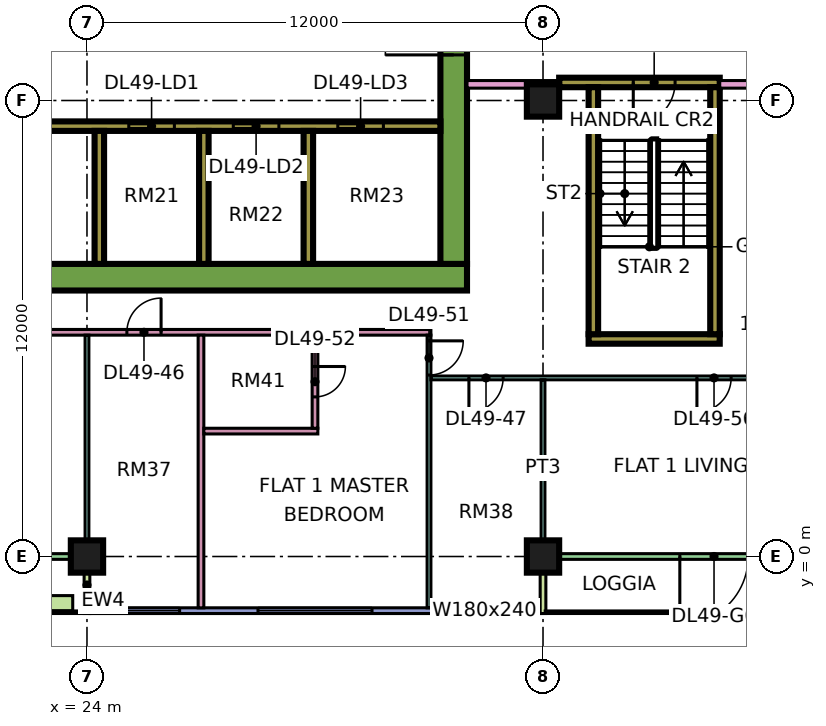
"""IFC4 building model, lengths in metres.
Left out: names, types, materials, properties, quantities, classifications, styles, units other than length and angle.
Written with IfcOpenShell. Run it as: python <this file> out.ifc"""

import sys

from ifc_helpers import new_model, si_unit, direction, frame, frame_2d, origin, origin_2d, place, context, subcontext, project, spatial, rectangle, extrude, element, fill, save


model = new_model("IFC4")
c1 = context("Model", 3, precision=1e-05, world=origin(), true_north=direction((0.0, 1.0)))
c2 = subcontext(c1, "Body", "Model", "MODEL_VIEW")
j1 = project(units=[si_unit("LENGTHUNIT", "METRE"), si_unit("PLANEANGLEUNIT", "RADIAN")], contexts=[c1])
p1 = place(None, origin())
s1 = spatial("IfcSite", under=j1, at=p1, CompositionType="ELEMENT")
p2 = place(p1, origin())
s2 = spatial("IfcBuilding", under=s1, at=p2, CompositionType="ELEMENT")
p3 = place(p2, frame((0.0, 0.0, 211.65)))
s3 = spatial("IfcBuildingStorey", under=s2, at=p3, CompositionType="ELEMENT", Elevation=211.65)
for number, where, z_axis, x_axis in (
    (1, (24.0, 0.0, 0.0), (0.0, 0.0, 1.0), (1.0, 0.0, 0.0)),
    (2, (36.0, 0.0, 0.0), (0.0, 0.0, 1.0), (1.0, 0.0, 0.0)),
    (3, (36.0, 12.0, 0.0), (0.0, 0.0, 1.0), (1.0, 0.0, 0.0)),
):
    element("IfcColumn", number, at=place(p3, frame(where, z_axis=z_axis, x_axis=x_axis)), inside=s3, PredefinedType="COLUMN", context=c2, shape_type="SweptSolid", body=[
        extrude(rectangle(XDim=0.85, YDim=0.85, at=origin_2d()), origin(), (0.0, 0.0, 1.0), 3.75),
    ])
p4 = place(p3, frame((9.0, 7.35, 0.0), z_axis=(0.0, 0.0, 1.0), x_axis=(1.0, 0.0, 0.0)))
e4 = element("IfcWall", 4, at=p4, inside=s3, PredefinedType="SHEAR", context=c2, shape_type="SweptSolid", body=[
    extrude(rectangle(XDim=25.0, YDim=0.7, at=frame_2d((12.5, 0.0))), origin(), (0.0, 0.0, 1.0), 3.75),
])
p5 = place(p3, frame((33.65, 7.7, 0.0), z_axis=(0.0, 0.0, 1.0), x_axis=(0.0, 1.0, 0.0)))
e5 = element("IfcWall", 5, at=p5, inside=s3, PredefinedType="SHEAR", context=c2, shape_type="SweptSolid", body=[
    extrude(rectangle(XDim=11.6, YDim=0.7, at=frame_2d((5.8, 0.0))), origin(), (0.0, 0.0, 1.0), 3.75),
])
p6 = place(p5, frame((5.5, 0.0, 0.0)))
e6 = element("IfcOpeningElement", 6, at=p6, cuts=e5, PredefinedType="OPENING", context=c2, shape_type="SweptSolid", body=[
    extrude(rectangle(XDim=1.8, YDim=2.4, at=frame_2d((0.9, 1.2))), frame((0.0, 0.36, 0.0), z_axis=(0.0, -1.0, 0.0), x_axis=(1.0, 0.0, 0.0)), (0.0, 0.0, 1.0), 0.72),
])
p7 = place(p3, frame((13.45, 11.325, 0.0), z_axis=(0.0, 0.0, 1.0), x_axis=(1.0, 0.0, 0.0)))
e7 = element("IfcWall", 7, at=p7, inside=s3, PredefinedType="SHEAR", context=c2, shape_type="SweptSolid", body=[
    extrude(rectangle(XDim=19.85, YDim=0.25, at=frame_2d((9.925, 0.0))), origin(), (0.0, 0.0, 1.0), 3.75),
])
p8 = place(p7, frame((11.65, 0.0, 0.0)))
e8 = element("IfcOpeningElement", 8, at=p8, cuts=e7, PredefinedType="OPENING", context=c2, shape_type="SweptSolid", body=[
    extrude(rectangle(XDim=1.2, YDim=2.2, at=frame_2d((0.6, 1.1))), frame((0.0, 0.135, 0.0), z_axis=(0.0, -1.0, 0.0), x_axis=(1.0, 0.0, 0.0)), (0.0, 0.0, 1.0), 0.27),
])
p9 = place(p7, frame((14.4, 0.0, 0.0)))
e9 = element("IfcOpeningElement", 9, at=p9, cuts=e7, PredefinedType="OPENING", context=c2, shape_type="SweptSolid", body=[
    extrude(rectangle(XDim=1.2, YDim=2.2, at=frame_2d((0.6, 1.1))), frame((0.0, 0.135, 0.0), z_axis=(0.0, -1.0, 0.0), x_axis=(1.0, 0.0, 0.0)), (0.0, 0.0, 1.0), 0.27),
])
p10 = place(p7, frame((17.15, 0.0, 0.0)))
e10 = element("IfcOpeningElement", 10, at=p10, cuts=e7, PredefinedType="OPENING", context=c2, shape_type="SweptSolid", body=[
    extrude(rectangle(XDim=1.2, YDim=2.2, at=frame_2d((0.6, 1.1))), frame((0.0, 0.135, 0.0), z_axis=(0.0, -1.0, 0.0), x_axis=(1.0, 0.0, 0.0)), (0.0, 0.0, 1.0), 0.27),
])
p11 = place(p7, frame((4.925, 0.0, 0.0)))
e11 = element("IfcOpeningElement", 11, at=p11, cuts=e7, PredefinedType="OPENING", context=c2, shape_type="SweptSolid", body=[
    extrude(rectangle(XDim=0.9, YDim=2.1, at=frame_2d((0.45, 1.05))), frame((0.0, 0.135, 0.0), z_axis=(0.0, -1.0, 0.0), x_axis=(1.0, 0.0, 0.0)), (0.0, 0.0, 1.0), 0.27),
])
for number, where, z_axis, x_axis in (
    (12, (24.325, 7.7, 0.0), (0.0, 0.0, 1.0), (0.0, 1.0, 0.0)),
    (13, (27.075, 7.7, 0.0), (0.0, 0.0, 1.0), (0.0, 1.0, 0.0)),
    (14, (29.825, 7.7, 0.0), (0.0, 0.0, 1.0), (0.0, 1.0, 0.0)),
):
    element("IfcWall", number, at=place(p3, frame(where, z_axis=z_axis, x_axis=x_axis)), inside=s3, PredefinedType="SHEAR", context=c2, shape_type="SweptSolid", body=[
        extrude(rectangle(XDim=3.5, YDim=0.25, at=frame_2d((1.75, 0.0))), origin(), (0.0, 0.0, 1.0), 3.75),
    ])
p12 = place(p3, frame((37.2, 5.725, 0.0), z_axis=(0.0, 0.0, 1.0), x_axis=(1.0, 0.0, 0.0)))
e15 = element("IfcWall", 15, at=p12, inside=s3, PredefinedType="SHEAR", context=c2, shape_type="SweptSolid", body=[
    extrude(rectangle(XDim=3.45, YDim=0.25, at=frame_2d((1.725, 0.0))), origin(), (0.0, 0.0, 1.0), 3.75),
])
p13 = place(p3, frame((36.425, 12.475, 0.0), z_axis=(0.0, 0.0, 1.0), x_axis=(1.0, 0.0, 0.0)))
e16 = element("IfcWall", 16, at=p13, inside=s3, PredefinedType="SHEAR", context=c2, shape_type="SweptSolid", body=[
    extrude(rectangle(XDim=4.225, YDim=0.25, at=frame_2d((2.112, 0.0))), origin(), (0.0, 0.0, 1.0), 3.75),
])
p14 = place(p13, frame((1.95, 0.0, 0.0)))
e17 = element("IfcOpeningElement", 17, at=p14, cuts=e16, PredefinedType="OPENING", context=c2, shape_type="SweptSolid", body=[
    extrude(rectangle(XDim=1.1, YDim=2.2, at=frame_2d((0.55, 1.1))), frame((0.0, 0.135, 0.0), z_axis=(0.0, -1.0, 0.0), x_axis=(1.0, 0.0, 0.0)), (0.0, 0.0, 1.0), 0.27),
])
for number, where, z_axis, x_axis in (
    (18, (37.325, 5.85, 0.0), (0.0, 0.0, 1.0), (0.0, 1.0, 0.0)),
    (19, (40.525, 5.85, 0.0), (0.0, 0.0, 1.0), (0.0, 1.0, 0.0)),
):
    element("IfcWall", number, at=place(p3, frame(where, z_axis=z_axis, x_axis=x_axis)), inside=s3, PredefinedType="SHEAR", context=c2, shape_type="SweptSolid", body=[
        extrude(rectangle(XDim=6.5, YDim=0.25, at=frame_2d((3.25, 0.0))), origin(), (0.0, 0.0, 1.0), 3.75),
    ])
p15 = place(p3, frame((12.575, 0.0, 0.0), z_axis=(0.0, 0.0, 1.0), x_axis=(1.0, 0.0, 0.0)))
e20 = element("IfcWall", 20, at=p15, inside=s3, PredefinedType="SOLIDWALL", context=c2, shape_type="SweptSolid", body=[
    extrude(rectangle(XDim=11.35, YDim=0.15, at=frame_2d((5.675, 0.0))), origin(), (0.0, 0.0, 1.0), 3.35),
])
p16 = place(p15, frame((0.613, 0.0, 0.0)))
e21 = element("IfcOpeningElement", 21, at=p16, cuts=e20, PredefinedType="OPENING", context=c2, shape_type="SweptSolid", body=[
    extrude(rectangle(XDim=1.2, YDim=2.4, at=frame_2d((0.6, 1.2))), frame((0.0, 0.085, 0.0), z_axis=(0.0, -1.0, 0.0), x_axis=(1.0, 0.0, 0.0)), (0.0, 0.0, 1.0), 0.17),
])
p17 = place(p15, frame((5.163, 0.0, 0.45)))
e22 = element("IfcOpeningElement", 22, at=p17, cuts=e20, PredefinedType="OPENING", context=c2, shape_type="SweptSolid", body=[
    extrude(rectangle(XDim=3.0, YDim=2.4, at=frame_2d((1.5, 1.2))), frame((0.0, 0.085, 0.0), z_axis=(0.0, -1.0, 0.0), x_axis=(1.0, 0.0, 0.0)), (0.0, 0.0, 1.0), 0.17),
])
p18 = place(p3, frame((24.0, -1.5, 0.0), z_axis=(0.0, 0.0, 1.0), x_axis=(0.0, 1.0, 0.0)))
e23 = element("IfcWall", 23, at=p18, inside=s3, PredefinedType="SOLIDWALL", context=c2, shape_type="SweptSolid", body=[
    extrude(rectangle(XDim=1.5, YDim=0.15, at=frame_2d((0.75, 0.0))), origin(), (0.0, 0.0, 1.0), 3.35),
])
p19 = place(p3, frame((24.075, -1.425, 0.0), z_axis=(0.0, 0.0, 1.0), x_axis=(1.0, 0.0, 0.0)))
e24 = element("IfcWall", 24, at=p19, inside=s3, PredefinedType="SOLIDWALL", context=c2, shape_type="SweptSolid", body=[
    extrude(rectangle(XDim=11.85, YDim=0.15, at=frame_2d((5.925, 0.0))), origin(), (0.0, 0.0, 1.0), 3.35),
])
p20 = place(p19, frame((0.562, 0.0, 0.45)))
e25 = element("IfcOpeningElement", 25, at=p20, cuts=e24, PredefinedType="OPENING", context=c2, shape_type="SweptSolid", body=[
    extrude(rectangle(XDim=1.8, YDim=2.4, at=frame_2d((0.9, 1.2))), frame((0.0, 0.085, 0.0), z_axis=(0.0, -1.0, 0.0), x_axis=(1.0, 0.0, 0.0)), (0.0, 0.0, 1.0), 0.17),
])
p21 = place(p19, frame((4.425, 0.0, 0.45)))
e26 = element("IfcOpeningElement", 26, at=p21, cuts=e24, PredefinedType="OPENING", context=c2, shape_type="SweptSolid", body=[
    extrude(rectangle(XDim=3.0, YDim=2.4, at=frame_2d((1.5, 1.2))), frame((0.0, 0.085, 0.0), z_axis=(0.0, -1.0, 0.0), x_axis=(1.0, 0.0, 0.0)), (0.0, 0.0, 1.0), 0.17),
])
p22 = place(p19, frame((9.488, 0.0, 0.45)))
e27 = element("IfcOpeningElement", 27, at=p22, cuts=e24, PredefinedType="OPENING", context=c2, shape_type="SweptSolid", body=[
    extrude(rectangle(XDim=1.8, YDim=2.4, at=frame_2d((0.9, 1.2))), frame((0.0, 0.085, 0.0), z_axis=(0.0, -1.0, 0.0), x_axis=(1.0, 0.0, 0.0)), (0.0, 0.0, 1.0), 0.17),
])
p23 = place(p3, frame((36.075, 0.0, 0.0), z_axis=(0.0, 0.0, 1.0), x_axis=(1.0, 0.0, 0.0)))
e28 = element("IfcWall", 28, at=p23, inside=s3, PredefinedType="SOLIDWALL", context=c2, shape_type="SweptSolid", body=[
    extrude(rectangle(XDim=11.85, YDim=0.15, at=frame_2d((5.925, 0.0))), origin(), (0.0, 0.0, 1.0), 3.35),
])
p24 = place(p23, frame((3.525, 0.0, 0.0)))
e29 = element("IfcOpeningElement", 29, at=p24, cuts=e28, PredefinedType="OPENING", context=c2, shape_type="SweptSolid", body=[
    extrude(rectangle(XDim=1.8, YDim=2.4, at=frame_2d((0.9, 1.2))), frame((0.0, 0.085, 0.0), z_axis=(0.0, -1.0, 0.0), x_axis=(1.0, 0.0, 0.0)), (0.0, 0.0, 1.0), 0.17),
])
p25 = place(p23, frame((10.05, 0.0, 0.45)))
e30 = element("IfcOpeningElement", 30, at=p25, cuts=e28, PredefinedType="OPENING", context=c2, shape_type="SweptSolid", body=[
    extrude(rectangle(XDim=1.2, YDim=2.4, at=frame_2d((0.6, 1.2))), frame((0.0, 0.085, 0.0), z_axis=(0.0, -1.0, 0.0), x_axis=(1.0, 0.0, 0.0)), (0.0, 0.0, 1.0), 0.17),
])
p26 = place(p3, frame((36.0, -1.5, 0.0), z_axis=(0.0, 0.0, 1.0), x_axis=(0.0, 1.0, 0.0)))
e31 = element("IfcWall", 31, at=p26, inside=s3, PredefinedType="SOLIDWALL", context=c2, shape_type="SweptSolid", body=[
    extrude(rectangle(XDim=1.5, YDim=0.15, at=frame_2d((0.75, 0.0))), origin(), (0.0, 0.0, 1.0), 3.35),
])
p27 = place(p3, frame((12.875, -1.229, 0.0), z_axis=(0.0, 0.0, 1.0), x_axis=(1.0, 0.0, 0.0)))
e32 = element("IfcWall", 32, at=p27, inside=s3, PredefinedType="SOLIDWALL", context=c2, shape_type="SweptSolid", body=[
    extrude(rectangle(XDim=10.75, YDim=0.4, at=frame_2d((5.375, 0.0))), origin(), (0.0, 0.0, 1.0), 0.7),
])
p28 = place(p3, frame((11.95, 5.9, 0.0), z_axis=(0.0, 0.0, 1.0), x_axis=(1.0, 0.0, 0.0)))
e33 = element("IfcWall", 33, at=p28, inside=s3, PredefinedType="PARTITIONING", context=c2, shape_type="SweptSolid", body=[
    extrude(rectangle(XDim=21.1, YDim=0.15, at=frame_2d((10.55, 0.0))), origin(), (0.0, 0.0, 1.0), 3.35),
])
p29 = place(p28, frame((1.1, 0.0, 0.0)))
e34 = element("IfcOpeningElement", 34, at=p29, cuts=e33, PredefinedType="OPENING", context=c2, shape_type="SweptSolid", body=[
    extrude(rectangle(XDim=0.9, YDim=2.1, at=frame_2d((0.45, 1.05))), frame((0.0, 0.085, 0.0), z_axis=(0.0, -1.0, 0.0), x_axis=(1.0, 0.0, 0.0)), (0.0, 0.0, 1.0), 0.17),
])
p30 = place(p28, frame((13.1, 0.0, 0.0)))
e35 = element("IfcOpeningElement", 35, at=p30, cuts=e33, PredefinedType="OPENING", context=c2, shape_type="SweptSolid", body=[
    extrude(rectangle(XDim=0.9, YDim=2.1, at=frame_2d((0.45, 1.05))), frame((0.0, 0.085, 0.0), z_axis=(0.0, -1.0, 0.0), x_axis=(1.0, 0.0, 0.0)), (0.0, 0.0, 1.0), 0.17),
])
p31 = place(p28, frame((7.1, 0.0, 0.0)))
e36 = element("IfcOpeningElement", 36, at=p31, cuts=e33, PredefinedType="OPENING", context=c2, shape_type="SweptSolid", body=[
    extrude(rectangle(XDim=0.9, YDim=2.1, at=frame_2d((0.45, 1.05))), frame((0.0, 0.085, 0.0), z_axis=(0.0, -1.0, 0.0), x_axis=(1.0, 0.0, 0.0)), (0.0, 0.0, 1.0), 0.17),
])
p32 = place(p3, frame((24.0, 0.0, 0.0), z_axis=(0.0, 0.0, 1.0), x_axis=(0.0, 1.0, 0.0)))
e37 = element("IfcWall", 37, at=p32, inside=s3, PredefinedType="PARTITIONING", context=c2, shape_type="SweptSolid", body=[
    extrude(rectangle(XDim=5.825, YDim=0.1, at=frame_2d((2.913, 0.0))), origin(), (0.0, 0.0, 1.0), 3.35),
])
p33 = place(p3, frame((27.0, -1.351, 0.0), z_axis=(0.0, 0.0, 1.0), x_axis=(0.0, 1.0, 0.0)))
e38 = element("IfcWall", 38, at=p33, inside=s3, PredefinedType="PARTITIONING", context=c2, shape_type="SweptSolid", body=[
    extrude(rectangle(XDim=7.176, YDim=0.15, at=frame_2d((3.588, 0.0))), origin(), (0.0, 0.0, 1.0), 3.35),
])
p34 = place(p3, frame((27.075, 3.3, 0.0), z_axis=(0.0, 0.0, 1.0), x_axis=(1.0, 0.0, 0.0)))
e39 = element("IfcWall", 39, at=p34, inside=s3, PredefinedType="PARTITIONING", context=c2, shape_type="SweptSolid", body=[
    extrude(rectangle(XDim=3.0, YDim=0.15, at=frame_2d((1.5, 0.0))), origin(), (0.0, 0.0, 1.0), 3.35),
])
p35 = place(p3, frame((30.0, 3.375, 0.0), z_axis=(0.0, 0.0, 1.0), x_axis=(0.0, 1.0, 0.0)))
e40 = element("IfcWall", 40, at=p35, inside=s3, PredefinedType="PARTITIONING", context=c2, shape_type="SweptSolid", body=[
    extrude(rectangle(XDim=2.45, YDim=0.15, at=frame_2d((1.225, 0.0))), origin(), (0.0, 0.0, 1.0), 3.35),
])
p36 = place(p35, frame((0.825, 0.0, 0.0)))
e41 = element("IfcOpeningElement", 41, at=p36, cuts=e40, PredefinedType="OPENING", context=c2, shape_type="SweptSolid", body=[
    extrude(rectangle(XDim=0.8, YDim=2.1, at=frame_2d((0.4, 1.05))), frame((0.0, 0.085, 0.0), z_axis=(0.0, -1.0, 0.0), x_axis=(1.0, 0.0, 0.0)), (0.0, 0.0, 1.0), 0.17),
])
p37 = place(p3, frame((33.0, -1.351, 0.0), z_axis=(0.0, 0.0, 1.0), x_axis=(0.0, 1.0, 0.0)))
e42 = element("IfcWall", 42, at=p37, inside=s3, PredefinedType="PARTITIONING", context=c2, shape_type="SweptSolid", body=[
    extrude(rectangle(XDim=7.176, YDim=0.1, at=frame_2d((3.588, 0.0))), origin(), (0.0, 0.0, 1.0), 3.35),
])
p38 = place(p37, frame((6.126, 0.0, 0.0)))
e43 = element("IfcOpeningElement", 43, at=p38, cuts=e42, PredefinedType="OPENING", context=c2, shape_type="SweptSolid", body=[
    extrude(rectangle(XDim=0.9, YDim=2.1, at=frame_2d((0.45, 1.05))), frame((0.0, 0.06, 0.0), z_axis=(0.0, -1.0, 0.0), x_axis=(1.0, 0.0, 0.0)), (0.0, 0.0, 1.0), 0.12),
])
p39 = place(p3, frame((33.05, 4.7, 0.0), z_axis=(0.0, 0.0, 1.0), x_axis=(1.0, 0.0, 0.0)))
e44 = element("IfcWall", 44, at=p39, inside=s3, PredefinedType="PARTITIONING", context=c2, shape_type="SweptSolid", body=[
    extrude(rectangle(XDim=14.85, YDim=0.1, at=frame_2d((7.425, 0.0))), origin(), (0.0, 0.0, 1.0), 3.35),
])
p40 = place(p39, frame((1.0, 0.0, 0.0)))
e45 = element("IfcOpeningElement", 45, at=p40, cuts=e44, PredefinedType="OPENING", context=c2, shape_type="SweptSolid", body=[
    extrude(rectangle(XDim=0.9, YDim=2.1, at=frame_2d((0.45, 1.05))), frame((0.0, 0.06, 0.0), z_axis=(0.0, -1.0, 0.0), x_axis=(1.0, 0.0, 0.0)), (0.0, 0.0, 1.0), 0.12),
])
p41 = place(p39, frame((13.0, 0.0, 0.0)))
e46 = element("IfcOpeningElement", 46, at=p41, cuts=e44, PredefinedType="OPENING", context=c2, shape_type="SweptSolid", body=[
    extrude(rectangle(XDim=0.9, YDim=2.1, at=frame_2d((0.45, 1.05))), frame((0.0, 0.06, 0.0), z_axis=(0.0, -1.0, 0.0), x_axis=(1.0, 0.0, 0.0)), (0.0, 0.0, 1.0), 0.12),
])
p42 = place(p39, frame((7.0, 0.0, 0.0)))
e47 = element("IfcOpeningElement", 47, at=p42, cuts=e44, PredefinedType="OPENING", context=c2, shape_type="SweptSolid", body=[
    extrude(rectangle(XDim=0.9, YDim=2.1, at=frame_2d((0.45, 1.05))), frame((0.0, 0.06, 0.0), z_axis=(0.0, -1.0, 0.0), x_axis=(1.0, 0.0, 0.0)), (0.0, 0.0, 1.0), 0.12),
])
p43 = place(p3, frame((34.0, 12.425, 0.0), z_axis=(0.0, 0.0, 1.0), x_axis=(1.0, 0.0, 0.0)))
e48 = element("IfcWall", 48, at=p43, inside=s3, PredefinedType="PARTITIONING", context=c2, shape_type="SweptSolid", body=[
    extrude(rectangle(XDim=2.426, YDim=0.2, at=frame_2d((1.213, 0.0))), origin(), (0.0, 0.0, 1.0), 3.35),
])
p44 = place(p3, frame((36.0, 0.0, 0.0), z_axis=(0.0, 0.0, 1.0), x_axis=(0.0, 1.0, 0.0)))
e49 = element("IfcWall", 49, at=p44, inside=s3, PredefinedType="PARTITIONING", context=c2, shape_type="SweptSolid", body=[
    extrude(rectangle(XDim=4.65, YDim=0.1, at=frame_2d((2.325, 0.0))), origin(), (0.0, 0.0, 1.0), 3.35),
])
p45 = place(p3, frame((40.65, 12.425, 0.0), z_axis=(0.0, 0.0, 1.0), x_axis=(1.0, 0.0, 0.0)))
e50 = element("IfcWall", 50, at=p45, inside=s3, PredefinedType="PARTITIONING", context=c2, shape_type="SweptSolid", body=[
    extrude(rectangle(XDim=22.276, YDim=0.2, at=frame_2d((11.138, 0.0))), origin(), (0.0, 0.0, 1.0), 3.35),
])
p46 = place(p45, frame((17.1, 0.0, 0.0)))
e51 = element("IfcOpeningElement", 51, at=p46, cuts=e50, PredefinedType="OPENING", context=c2, shape_type="SweptSolid", body=[
    extrude(rectangle(XDim=1.0, YDim=2.1, at=frame_2d((0.5, 1.05))), frame((0.0, 0.11, 0.0), z_axis=(0.0, -1.0, 0.0), x_axis=(1.0, 0.0, 0.0)), (0.0, 0.0, 1.0), 0.22),
])
p47 = place(p45, frame((1.05, 0.0, 0.0)))
e52 = element("IfcOpeningElement", 52, at=p47, cuts=e50, PredefinedType="OPENING", context=c2, shape_type="SweptSolid", body=[
    extrude(rectangle(XDim=1.0, YDim=2.1, at=frame_2d((0.5, 1.05))), frame((0.0, 0.11, 0.0), z_axis=(0.0, -1.0, 0.0), x_axis=(1.0, 0.0, 0.0)), (0.0, 0.0, 1.0), 0.22),
])
p48 = place(p20, origin())
e53 = element("IfcWindow", 53, at=p48, inside=s3, PartitioningType="SINGLE_PANEL", PredefinedType="WINDOW", context=c2, shape_type="SweptSolid", body=[
    extrude(rectangle(XDim=1.8, YDim=2.4, at=frame_2d((0.9, 1.2))), frame((0.0, 0.03, 0.0), z_axis=(0.0, -1.0, 0.0), x_axis=(1.0, 0.0, 0.0)), (0.0, 0.0, 1.0), 0.06),
])
fill(e25, e53)
p49 = place(p21, origin())
e54 = element("IfcWindow", 54, at=p49, inside=s3, PartitioningType="SINGLE_PANEL", PredefinedType="WINDOW", context=c2, shape_type="SweptSolid", body=[
    extrude(rectangle(XDim=3.0, YDim=2.4, at=frame_2d((1.5, 1.2))), frame((0.0, 0.03, 0.0), z_axis=(0.0, -1.0, 0.0), x_axis=(1.0, 0.0, 0.0)), (0.0, 0.0, 1.0), 0.06),
])
fill(e26, e54)
p50 = place(p22, origin())
e55 = element("IfcWindow", 55, at=p50, inside=s3, PartitioningType="SINGLE_PANEL", PredefinedType="WINDOW", context=c2, shape_type="SweptSolid", body=[
    extrude(rectangle(XDim=1.8, YDim=2.4, at=frame_2d((0.9, 1.2))), frame((0.0, 0.03, 0.0), z_axis=(0.0, -1.0, 0.0), x_axis=(1.0, 0.0, 0.0)), (0.0, 0.0, 1.0), 0.06),
])
fill(e27, e55)
p51 = place(p24, frame((1.8, 0.0, 0.0), z_axis=(0.0, 0.0, 1.0), x_axis=(-1.0, 0.0, 0.0)))
e56 = element("IfcDoor", 56, at=p51, inside=s3, OperationType="DOUBLE_DOOR_SINGLE_SWING", PredefinedType="DOOR", context=c2, shape_type="SweptSolid", body=[
    extrude(rectangle(XDim=1.8, YDim=2.4, at=frame_2d((0.9, 1.2))), frame((0.0, 0.025, 0.0), z_axis=(0.0, -1.0, 0.0), x_axis=(1.0, 0.0, 0.0)), (0.0, 0.0, 1.0), 0.05),
])
fill(e29, e56)
p52 = place(p8, origin())
e57 = element("IfcDoor", 57, at=p52, inside=s3, OperationType="DOUBLE_DOOR_SLIDING", PredefinedType="DOOR", context=c2, shape_type="SweptSolid", body=[
    extrude(rectangle(XDim=1.2, YDim=2.2, at=frame_2d((0.6, 1.1))), frame((0.0, 0.025, 0.0), z_axis=(0.0, -1.0, 0.0), x_axis=(1.0, 0.0, 0.0)), (0.0, 0.0, 1.0), 0.05),
])
fill(e8, e57)
p53 = place(p9, origin())
e58 = element("IfcDoor", 58, at=p53, inside=s3, OperationType="DOUBLE_DOOR_SLIDING", PredefinedType="DOOR", context=c2, shape_type="SweptSolid", body=[
    extrude(rectangle(XDim=1.2, YDim=2.2, at=frame_2d((0.6, 1.1))), frame((0.0, 0.025, 0.0), z_axis=(0.0, -1.0, 0.0), x_axis=(1.0, 0.0, 0.0)), (0.0, 0.0, 1.0), 0.05),
])
fill(e9, e58)
p54 = place(p10, origin())
e59 = element("IfcDoor", 59, at=p54, inside=s3, OperationType="DOUBLE_DOOR_SLIDING", PredefinedType="DOOR", context=c2, shape_type="SweptSolid", body=[
    extrude(rectangle(XDim=1.2, YDim=2.2, at=frame_2d((0.6, 1.1))), frame((0.0, 0.025, 0.0), z_axis=(0.0, -1.0, 0.0), x_axis=(1.0, 0.0, 0.0)), (0.0, 0.0, 1.0), 0.05),
])
fill(e10, e59)
p55 = place(p6, origin())
e60 = element("IfcDoor", 60, at=p55, inside=s3, OperationType="DOUBLE_DOOR_SINGLE_SWING", PredefinedType="DOOR", context=c2, shape_type="SweptSolid", body=[
    extrude(rectangle(XDim=1.8, YDim=2.4, at=frame_2d((0.9, 1.2))), frame((0.0, 0.025, 0.0), z_axis=(0.0, -1.0, 0.0), x_axis=(1.0, 0.0, 0.0)), (0.0, 0.0, 1.0), 0.05),
])
fill(e6, e60)
p56 = place(p14, frame((1.1, 0.0, 0.0), z_axis=(0.0, 0.0, 1.0), x_axis=(-1.0, 0.0, 0.0)))
e61 = element("IfcDoor", 61, at=p56, inside=s3, OperationType="SINGLE_SWING_LEFT", PredefinedType="DOOR", context=c2, shape_type="SweptSolid", body=[
    extrude(rectangle(XDim=1.1, YDim=2.2, at=frame_2d((0.55, 1.1))), frame((0.0, 0.025, 0.0), z_axis=(0.0, -1.0, 0.0), x_axis=(1.0, 0.0, 0.0)), (0.0, 0.0, 1.0), 0.05),
])
fill(e17, e61)
p57 = place(p30, frame((0.9, 0.0, 0.0), z_axis=(0.0, 0.0, 1.0), x_axis=(-1.0, 0.0, 0.0)))
e62 = element("IfcDoor", 62, at=p57, inside=s3, OperationType="SINGLE_SWING_RIGHT", PredefinedType="DOOR", context=c2, shape_type="SweptSolid", body=[
    extrude(rectangle(XDim=0.9, YDim=2.1, at=frame_2d((0.45, 1.05))), frame((0.0, 0.025, 0.0), z_axis=(0.0, -1.0, 0.0), x_axis=(1.0, 0.0, 0.0)), (0.0, 0.0, 1.0), 0.05),
])
fill(e35, e62)
p58 = place(p40, frame((0.9, 0.0, 0.0), z_axis=(0.0, 0.0, 1.0), x_axis=(-1.0, 0.0, 0.0)))
e63 = element("IfcDoor", 63, at=p58, inside=s3, OperationType="SINGLE_SWING_LEFT", PredefinedType="DOOR", context=c2, shape_type="SweptSolid", body=[
    extrude(rectangle(XDim=0.9, YDim=2.1, at=frame_2d((0.45, 1.05))), frame((0.0, 0.025, 0.0), z_axis=(0.0, -1.0, 0.0), x_axis=(1.0, 0.0, 0.0)), (0.0, 0.0, 1.0), 0.05),
])
fill(e45, e63)
p59 = place(p38, origin())
e64 = element("IfcDoor", 64, at=p59, inside=s3, OperationType="SINGLE_SWING_RIGHT", PredefinedType="DOOR", context=c2, shape_type="SweptSolid", body=[
    extrude(rectangle(XDim=0.9, YDim=2.1, at=frame_2d((0.45, 1.05))), frame((0.0, 0.025, 0.0), z_axis=(0.0, -1.0, 0.0), x_axis=(1.0, 0.0, 0.0)), (0.0, 0.0, 1.0), 0.05),
])
fill(e43, e64)
p60 = place(p36, origin())
e65 = element("IfcDoor", 65, at=p60, inside=s3, OperationType="SINGLE_SWING_RIGHT", PredefinedType="DOOR", context=c2, shape_type="SweptSolid", body=[
    extrude(rectangle(XDim=0.8, YDim=2.1, at=frame_2d((0.4, 1.05))), frame((0.0, 0.025, 0.0), z_axis=(0.0, -1.0, 0.0), x_axis=(1.0, 0.0, 0.0)), (0.0, 0.0, 1.0), 0.05),
])
fill(e41, e65)
p61 = place(p42, frame((0.9, 0.0, 0.0), z_axis=(0.0, 0.0, 1.0), x_axis=(-1.0, 0.0, 0.0)))
e66 = element("IfcDoor", 66, at=p61, inside=s3, OperationType="SINGLE_SWING_LEFT", PredefinedType="DOOR", context=c2, shape_type="SweptSolid", body=[
    extrude(rectangle(XDim=0.9, YDim=2.1, at=frame_2d((0.45, 1.05))), frame((0.0, 0.025, 0.0), z_axis=(0.0, -1.0, 0.0), x_axis=(1.0, 0.0, 0.0)), (0.0, 0.0, 1.0), 0.05),
])
fill(e47, e66)
save(model, sys.argv[1])
